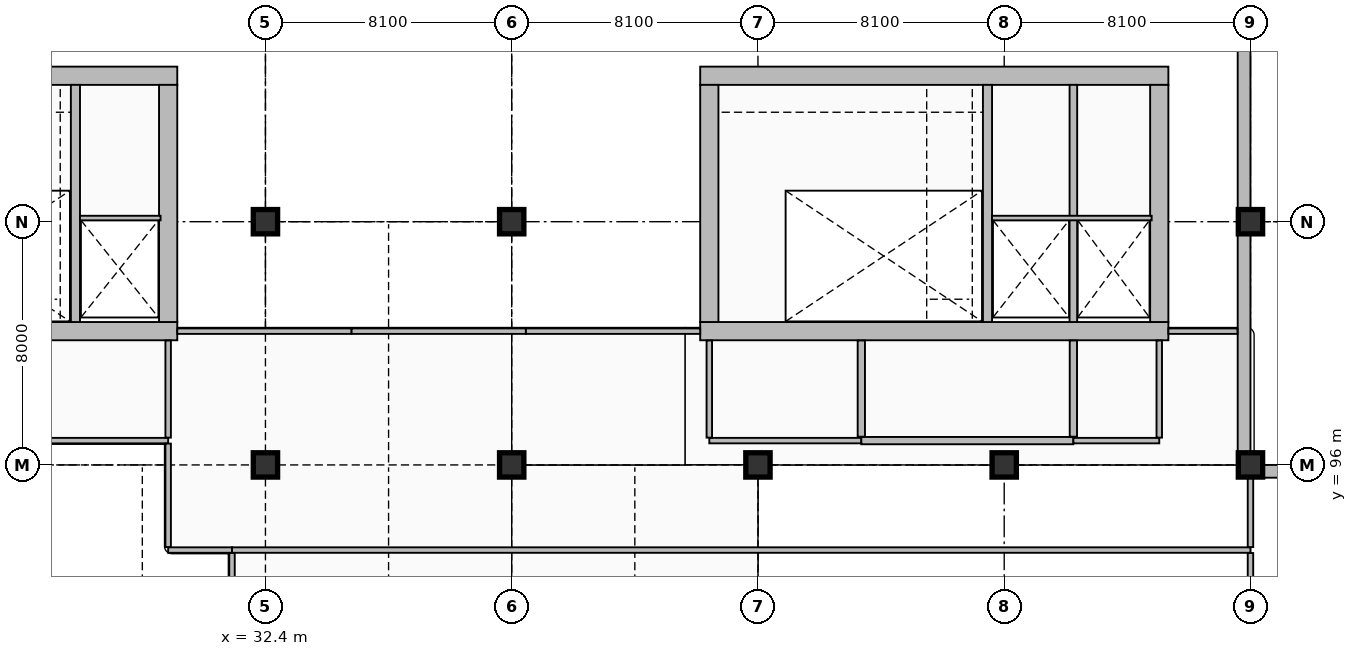
"""IFC4 building model, lengths in metres.
Left out: names, types, materials, properties, quantities, classifications, styles, units other than length and angle.
Written with IfcOpenShell. Run it as: python <this file> out.ifc"""

import sys

from ifc_helpers import new_model, si_unit, direction, frame, frame_2d, origin, origin_2d, place, context, subcontext, project, spatial, rectangle, extrude, element, fill, save


model = new_model("IFC4")
c1 = context("Model", 3, precision=1e-05, world=origin(), true_north=direction((0.0, 1.0)))
c2 = subcontext(c1, "Body", "Model", "MODEL_VIEW")
j1 = project(units=[si_unit("LENGTHUNIT", "METRE"), si_unit("PLANEANGLEUNIT", "RADIAN")], contexts=[c1])
p1 = place(None, origin())
s1 = spatial("IfcSite", under=j1, at=p1, CompositionType="ELEMENT")
p2 = place(p1, origin())
s2 = spatial("IfcBuilding", under=s1, at=p2, CompositionType="ELEMENT")
p3 = place(p2, frame((0.0, 0.0, -4.8)))
s3 = spatial("IfcBuildingStorey", under=s2, at=p3, CompositionType="ELEMENT", Elevation=-4.8)
p4 = place(p3, frame((64.59, 111.79, 0.0), z_axis=(0.0, 0.0, 1.0), x_axis=(0.0, -1.0, 0.0)))
e1 = element("IfcWall", 1, at=p4, inside=s3, PredefinedType="USERDEFINED", context=c2, shape_type="SweptSolid", body=[
    extrude(rectangle(XDim=15.79, YDim=0.42, at=frame_2d((7.895, 0.0))), origin(), (0.0, 0.0, 1.0), 4.45),
])
p5 = place(p3, frame((64.8, 95.79, 0.0), z_axis=(0.0, 0.0, 1.0), x_axis=(1.0, 0.0, 0.0)))
e2 = element("IfcWall", 2, at=p5, inside=s3, PredefinedType="USERDEFINED", context=c2, shape_type="SweptSolid", body=[
    extrude(rectangle(XDim=61.99, YDim=0.42, at=frame_2d((30.995, 0.0))), origin(), (0.0, 0.0, 1.0), 4.45),
])
p6 = place(p3, frame((16.42, 100.4, 0.0), z_axis=(0.0, 0.0, 1.0), x_axis=(1.0, 0.0, 0.0)))
e3 = element("IfcWall", 3, at=p6, inside=s3, PredefinedType="SHEAR", context=c2, shape_type="SweptSolid", body=[
    extrude(rectangle(XDim=13.08, YDim=0.6, at=frame_2d((6.54, 0.0))), origin(), (0.0, 0.0, 1.0), 4.8),
])
p7 = place(p6, frame((1.33, 0.0, 0.0)))
e4 = element("IfcOpeningElement", 4, at=p7, cuts=e3, PredefinedType="OPENING", context=c2, shape_type="SweptSolid", body=[
    extrude(rectangle(XDim=1.15, YDim=2.25, at=frame_2d((0.575, 1.125))), frame((0.0, 0.31, 0.0), z_axis=(0.0, -1.0, 0.0), x_axis=(1.0, 0.0, 0.0)), (0.0, 0.0, 1.0), 0.62),
])
p8 = place(p6, frame((10.635, 0.0, 0.0)))
e5 = element("IfcOpeningElement", 5, at=p8, cuts=e3, PredefinedType="OPENING", context=c2, shape_type="SweptSolid", body=[
    extrude(rectangle(XDim=1.1, YDim=2.2, at=frame_2d((0.55, 1.1))), frame((0.0, 0.31, 0.0), z_axis=(0.0, -1.0, 0.0), x_axis=(1.0, 0.0, 0.0)), (0.0, 0.0, 1.0), 0.62),
])
p9 = place(p3, frame((16.42, 108.8, 0.0), z_axis=(0.0, 0.0, 1.0), x_axis=(1.0, 0.0, 0.0)))
e6 = element("IfcWall", 6, at=p9, inside=s3, PredefinedType="SHEAR", context=c2, shape_type="SweptSolid", body=[
    extrude(rectangle(XDim=13.08, YDim=0.6, at=frame_2d((6.54, 0.0))), origin(), (0.0, 0.0, 1.0), 4.8),
])
p10 = place(p3, frame((29.2, 100.7, 0.0), z_axis=(0.0, 0.0, 1.0), x_axis=(0.0, 1.0, 0.0)))
e7 = element("IfcWall", 7, at=p10, inside=s3, PredefinedType="SHEAR", context=c2, shape_type="SweptSolid", body=[
    extrude(rectangle(XDim=7.8, YDim=0.6, at=frame_2d((3.9, 0.0))), origin(), (0.0, 0.0, 1.0), 4.8),
])
p11 = place(p3, frame((26.15, 100.7, 0.0), z_axis=(0.0, 0.0, 1.0), x_axis=(0.0, 1.0, 0.0)))
e8 = element("IfcWall", 8, at=p11, inside=s3, PredefinedType="SHEAR", context=c2, shape_type="SweptSolid", body=[
    extrude(rectangle(XDim=7.8, YDim=0.3, at=frame_2d((3.9, 0.0))), origin(), (0.0, 0.0, 1.0), 4.8),
])
p12 = place(p3, frame((46.7, 100.4, 0.0), z_axis=(0.0, 0.0, 1.0), x_axis=(1.0, 0.0, 0.0)))
e9 = element("IfcWall", 9, at=p12, inside=s3, PredefinedType="SHEAR", context=c2, shape_type="SweptSolid", body=[
    extrude(rectangle(XDim=15.4, YDim=0.6, at=frame_2d((7.7, 0.0))), origin(), (0.0, 0.0, 1.0), 4.8),
])
p13 = place(p12, frame((1.05, 0.0, 0.0)))
e10 = element("IfcOpeningElement", 10, at=p13, cuts=e9, PredefinedType="OPENING", context=c2, shape_type="SweptSolid", body=[
    extrude(rectangle(XDim=1.15, YDim=2.25, at=frame_2d((0.575, 1.125))), frame((0.0, 0.31, 0.0), z_axis=(0.0, -1.0, 0.0), x_axis=(1.0, 0.0, 0.0)), (0.0, 0.0, 1.0), 0.62),
])
p14 = place(p12, frame((10.333, 0.0, 0.0)))
e11 = element("IfcOpeningElement", 11, at=p14, cuts=e9, PredefinedType="OPENING", context=c2, shape_type="SweptSolid", body=[
    extrude(rectangle(XDim=1.1, YDim=2.2, at=frame_2d((0.55, 1.1))), frame((0.0, 0.31, 0.0), z_axis=(0.0, -1.0, 0.0), x_axis=(1.0, 0.0, 0.0)), (0.0, 0.0, 1.0), 0.62),
])
p15 = place(p12, frame((13.048, 0.0, 0.0)))
e12 = element("IfcOpeningElement", 12, at=p15, cuts=e9, PredefinedType="OPENING", context=c2, shape_type="SweptSolid", body=[
    extrude(rectangle(XDim=1.1, YDim=2.2, at=frame_2d((0.55, 1.1))), frame((0.0, 0.31, 0.0), z_axis=(0.0, -1.0, 0.0), x_axis=(1.0, 0.0, 0.0)), (0.0, 0.0, 1.0), 0.62),
])
p16 = place(p3, frame((46.7, 108.8, 0.0), z_axis=(0.0, 0.0, 1.0), x_axis=(1.0, 0.0, 0.0)))
e13 = element("IfcWall", 13, at=p16, inside=s3, PredefinedType="SHEAR", context=c2, shape_type="SweptSolid", body=[
    extrude(rectangle(XDim=15.4, YDim=0.6, at=frame_2d((7.7, 0.0))), origin(), (0.0, 0.0, 1.0), 4.8),
])
for number, where, z_axis, x_axis in (
    (14, (47.0, 100.7, 0.0), (0.0, 0.0, 1.0), (0.0, 1.0, 0.0)),
    (15, (61.8, 100.7, 0.0), (0.0, 0.0, 1.0), (0.0, 1.0, 0.0)),
):
    element("IfcWall", number, at=place(p3, frame(where, z_axis=z_axis, x_axis=x_axis)), inside=s3, PredefinedType="SHEAR", context=c2, shape_type="SweptSolid", body=[
        extrude(rectangle(XDim=7.8, YDim=0.6, at=frame_2d((3.9, 0.0))), origin(), (0.0, 0.0, 1.0), 4.8),
    ])
p17 = place(p3, frame((56.15, 100.7, 0.0), z_axis=(0.0, 0.0, 1.0), x_axis=(0.0, 1.0, 0.0)))
e16 = element("IfcWall", 16, at=p17, inside=s3, PredefinedType="SHEAR", context=c2, shape_type="SweptSolid", body=[
    extrude(rectangle(XDim=7.8, YDim=0.3, at=frame_2d((3.9, 0.0))), origin(), (0.0, 0.0, 1.0), 4.8),
])
p18 = place(p3, frame((58.975, 100.7, 0.0), z_axis=(0.0, 0.0, 1.0), x_axis=(0.0, 1.0, 0.0)))
e17 = element("IfcWall", 17, at=p18, inside=s3, PredefinedType="SHEAR", context=c2, shape_type="SweptSolid", body=[
    extrude(rectangle(XDim=7.8, YDim=0.25, at=frame_2d((3.9, 0.0))), origin(), (0.0, 0.0, 1.0), 4.8),
])
for number, where, z_axis, x_axis in (
    (18, (32.4, 96.0, 0.0), (0.0, 0.0, 1.0), (1.0, 0.0, 0.0)),
    (19, (32.4, 104.0, 0.0), (0.0, 0.0, 1.0), (1.0, 0.0, 0.0)),
    (20, (40.5, 96.0, 0.0), (0.0, 0.0, 1.0), (1.0, 0.0, 0.0)),
    (21, (40.5, 104.0, 0.0), (0.0, 0.0, 1.0), (1.0, 0.0, 0.0)),
    (22, (48.6, 96.0, 0.0), (0.0, 0.0, 1.0), (1.0, 0.0, 0.0)),
    (23, (56.7, 96.0, 0.0), (0.0, 0.0, 1.0), (1.0, 0.0, 0.0)),
    (24, (64.8, 96.0, 0.0), (0.0, 0.0, 1.0), (1.0, 0.0, 0.0)),
    (25, (64.8, 104.0, 0.0), (0.0, 0.0, 1.0), (1.0, 0.0, 0.0)),
):
    element("IfcColumn", number, at=place(p3, frame(where, z_axis=z_axis, x_axis=x_axis)), inside=s3, PredefinedType="COLUMN", context=c2, shape_type="SweptSolid", body=[
        extrude(rectangle(XDim=0.8, YDim=0.8, at=origin_2d()), origin(), (0.0, 0.0, 1.0), 4.8),
    ])
p19 = place(p3, frame((26.3, 104.12, 0.0), z_axis=(0.0, 0.0, 1.0), x_axis=(1.0, 0.0, 0.0)))
e26 = element("IfcWall", 26, at=p19, inside=s3, PredefinedType="PARTITIONING", context=c2, shape_type="SweptSolid", body=[
    extrude(rectangle(XDim=2.65, YDim=0.15, at=frame_2d((1.325, 0.0))), origin(), (0.0, 0.0, 1.0), 4.45),
])
p20 = place(p3, frame((56.3, 104.12, 0.0), z_axis=(0.0, 0.0, 1.0), x_axis=(1.0, 0.0, 0.0)))
e27 = element("IfcWall", 27, at=p20, inside=s3, PredefinedType="PARTITIONING", context=c2, shape_type="SweptSolid", body=[
    extrude(rectangle(XDim=5.25, YDim=0.15, at=frame_2d((2.625, 0.0))), origin(), (0.0, 0.0, 1.0), 4.45),
])
p21 = place(p3, frame((16.628, 96.8, 0.0), z_axis=(0.0, 0.0, 1.0), x_axis=(1.0, 0.0, 0.0)))
e28 = element("IfcWall", 28, at=p21, inside=s3, PredefinedType="PARTITIONING", context=c2, shape_type="SweptSolid", body=[
    extrude(rectangle(XDim=12.572, YDim=0.18, at=frame_2d((6.286, 0.0))), origin(), (0.0, 0.0, 1.0), 4.45),
])
p22 = place(p21, frame((4.73, 0.0, 0.0)))
e29 = element("IfcOpeningElement", 29, at=p22, cuts=e28, PredefinedType="OPENING", context=c2, shape_type="SweptSolid", body=[
    extrude(rectangle(XDim=1.1, YDim=2.2, at=frame_2d((0.55, 1.1))), frame((0.0, 0.1, 0.0), z_axis=(0.0, -1.0, 0.0), x_axis=(1.0, 0.0, 0.0)), (0.0, 0.0, 1.0), 0.2),
])
p23 = place(p3, frame((29.2, 93.2, 0.0), z_axis=(0.0, 0.0, 1.0), x_axis=(1.0, 0.0, 0.0)))
e30 = element("IfcWall", 30, at=p23, inside=s3, PredefinedType="PARTITIONING", context=c2, shape_type="SweptSolid", body=[
    extrude(rectangle(XDim=2.1, YDim=0.18, at=frame_2d((1.05, 0.0))), origin(), (0.0, 0.0, 1.0), 4.45),
])
p24 = place(p3, frame((29.5, 100.4, 0.0), z_axis=(0.0, 0.0, 1.0), x_axis=(1.0, 0.0, 0.0)))
e31 = element("IfcWall", 31, at=p24, inside=s3, PredefinedType="PARTITIONING", context=c2, shape_type="SweptSolid", body=[
    extrude(rectangle(XDim=5.733, YDim=0.18, at=frame_2d((2.867, 0.0))), origin(), (0.0, 0.0, 1.0), 4.45),
])
p25 = place(p3, frame((35.233, 100.4, 0.0), z_axis=(0.0, 0.0, 1.0), x_axis=(1.0, 0.0, 0.0)))
e32 = element("IfcWall", 32, at=p25, inside=s3, PredefinedType="PARTITIONING", context=c2, shape_type="SweptSolid", body=[
    extrude(rectangle(XDim=5.733, YDim=0.18, at=frame_2d((2.867, 0.0))), origin(), (0.0, 0.0, 1.0), 4.45),
])
p26 = place(p3, frame((40.967, 100.4, 0.0), z_axis=(0.0, 0.0, 1.0), x_axis=(1.0, 0.0, 0.0)))
e33 = element("IfcWall", 33, at=p26, inside=s3, PredefinedType="PARTITIONING", context=c2, shape_type="SweptSolid", body=[
    extrude(rectangle(XDim=5.733, YDim=0.18, at=frame_2d((2.867, 0.0))), origin(), (0.0, 0.0, 1.0), 4.45),
])
p27 = place(p3, frame((31.3, 93.2, 0.0), z_axis=(0.0, 0.0, 1.0), x_axis=(1.0, 0.0, 0.0)))
e34 = element("IfcWall", 34, at=p27, inside=s3, PredefinedType="PARTITIONING", context=c2, shape_type="SweptSolid", body=[
    extrude(rectangle(XDim=33.5, YDim=0.18, at=frame_2d((16.75, 0.0))), origin(), (0.0, 0.0, 1.0), 4.45),
])
p28 = place(p27, frame((16.15, 0.0, 0.0)))
e35 = element("IfcOpeningElement", 35, at=p28, cuts=e34, PredefinedType="OPENING", context=c2, shape_type="SweptSolid", body=[
    extrude(rectangle(XDim=1.2, YDim=2.2, at=frame_2d((0.6, 1.1))), frame((0.0, 0.1, 0.0), z_axis=(0.0, -1.0, 0.0), x_axis=(1.0, 0.0, 0.0)), (0.0, 0.0, 1.0), 0.2),
])
p29 = place(p3, frame((47.0, 96.8, 0.0), z_axis=(0.0, 0.0, 1.0), x_axis=(1.0, 0.0, 0.0)))
e36 = element("IfcWall", 36, at=p29, inside=s3, PredefinedType="PARTITIONING", context=c2, shape_type="SweptSolid", body=[
    extrude(rectangle(XDim=5.0, YDim=0.18, at=frame_2d((2.5, 0.0))), origin(), (0.0, 0.0, 1.0), 4.45),
])
p30 = place(p29, frame((3.55, 0.0, 0.0)))
e37 = element("IfcOpeningElement", 37, at=p30, cuts=e36, PredefinedType="OPENING", context=c2, shape_type="SweptSolid", body=[
    extrude(rectangle(XDim=1.1, YDim=2.2, at=frame_2d((0.55, 1.1))), frame((0.0, 0.1, 0.0), z_axis=(0.0, -1.0, 0.0), x_axis=(1.0, 0.0, 0.0)), (0.0, 0.0, 1.0), 0.2),
])
p31 = place(p3, frame((52.0, 96.8, 0.0), z_axis=(0.0, 0.0, 1.0), x_axis=(1.0, 0.0, 0.0)))
e38 = element("IfcWall", 38, at=p31, inside=s3, PredefinedType="PARTITIONING", context=c2, shape_type="SweptSolid", body=[
    extrude(rectangle(XDim=6.975, YDim=0.24, at=frame_2d((3.488, 0.0))), origin(), (0.0, 0.0, 1.0), 4.45),
])
p32 = place(p31, frame((1.771, 0.0, 0.0)))
e39 = element("IfcOpeningElement", 39, at=p32, cuts=e38, PredefinedType="OPENING", context=c2, shape_type="SweptSolid", body=[
    extrude(rectangle(XDim=1.2, YDim=2.3, at=frame_2d((0.6, 1.15))), frame((0.0, 0.13, 0.0), z_axis=(0.0, -1.0, 0.0), x_axis=(1.0, 0.0, 0.0)), (0.0, 0.0, 1.0), 0.26),
])
p33 = place(p3, frame((58.975, 96.8, 0.0), z_axis=(0.0, 0.0, 1.0), x_axis=(1.0, 0.0, 0.0)))
e40 = element("IfcWall", 40, at=p33, inside=s3, PredefinedType="PARTITIONING", context=c2, shape_type="SweptSolid", body=[
    extrude(rectangle(XDim=2.825, YDim=0.18, at=frame_2d((1.413, 0.0))), origin(), (0.0, 0.0, 1.0), 4.45),
])
p34 = place(p33, frame((0.863, 0.0, 0.0)))
e41 = element("IfcOpeningElement", 41, at=p34, cuts=e40, PredefinedType="OPENING", context=c2, shape_type="SweptSolid", body=[
    extrude(rectangle(XDim=1.1, YDim=2.2, at=frame_2d((0.55, 1.1))), frame((0.0, 0.1, 0.0), z_axis=(0.0, -1.0, 0.0), x_axis=(1.0, 0.0, 0.0)), (0.0, 0.0, 1.0), 0.2),
])
p35 = place(p3, frame((62.1, 100.4, 0.0), z_axis=(0.0, 0.0, 1.0), x_axis=(1.0, 0.0, 0.0)))
e42 = element("IfcWall", 42, at=p35, inside=s3, PredefinedType="PARTITIONING", context=c2, shape_type="SweptSolid", body=[
    extrude(rectangle(XDim=2.272, YDim=0.18, at=frame_2d((1.136, 0.0))), origin(), (0.0, 0.0, 1.0), 4.45),
])
p36 = place(p3, frame((29.2, 93.298, 0.0), z_axis=(0.0, 0.0, 1.0), x_axis=(0.0, 1.0, 0.0)))
e43 = element("IfcWall", 43, at=p36, inside=s3, PredefinedType="PARTITIONING", context=c2, shape_type="SweptSolid", body=[
    extrude(rectangle(XDim=3.404, YDim=0.18, at=frame_2d((1.702, 0.0))), origin(), (0.0, 0.0, 1.0), 4.45),
])
p37 = place(p3, frame((29.2, 96.898, 0.0), z_axis=(0.0, 0.0, 1.0), x_axis=(0.0, 1.0, 0.0)))
e44 = element("IfcWall", 44, at=p37, inside=s3, PredefinedType="PARTITIONING", context=c2, shape_type="SweptSolid", body=[
    extrude(rectangle(XDim=3.194, YDim=0.18, at=frame_2d((1.597, 0.0))), origin(), (0.0, 0.0, 1.0), 4.45),
])
p38 = place(p37, frame((0.997, 0.0, 0.0)))
e45 = element("IfcOpeningElement", 45, at=p38, cuts=e44, PredefinedType="OPENING", context=c2, shape_type="SweptSolid", body=[
    extrude(rectangle(XDim=1.2, YDim=2.2, at=frame_2d((0.6, 1.1))), frame((0.0, 0.1, 0.0), z_axis=(0.0, -1.0, 0.0), x_axis=(1.0, 0.0, 0.0)), (0.0, 0.0, 1.0), 0.2),
])
p39 = place(p3, frame((31.3, 87.898, 0.0), z_axis=(0.0, 0.0, 1.0), x_axis=(0.0, 1.0, 0.0)))
e46 = element("IfcWall", 46, at=p39, inside=s3, PredefinedType="PARTITIONING", context=c2, shape_type="SweptSolid", body=[
    extrude(rectangle(XDim=5.204, YDim=0.18, at=frame_2d((2.602, 0.0))), origin(), (0.0, 0.0, 1.0), 4.45),
])
p40 = place(p3, frame((47.0, 96.898, 0.0), z_axis=(0.0, 0.0, 1.0), x_axis=(0.0, 1.0, 0.0)))
e47 = element("IfcWall", 47, at=p40, inside=s3, PredefinedType="PARTITIONING", context=c2, shape_type="SweptSolid", body=[
    extrude(rectangle(XDim=3.194, YDim=0.18, at=frame_2d((1.597, 0.0))), origin(), (0.0, 0.0, 1.0), 4.45),
])
p41 = place(p3, frame((52.0, 96.928, 0.0), z_axis=(0.0, 0.0, 1.0), x_axis=(0.0, 1.0, 0.0)))
e48 = element("IfcWall", 48, at=p41, inside=s3, PredefinedType="PARTITIONING", context=c2, shape_type="SweptSolid", body=[
    extrude(rectangle(XDim=3.164, YDim=0.24, at=frame_2d((1.582, 0.0))), origin(), (0.0, 0.0, 1.0), 4.45),
])
p42 = place(p41, frame((1.082, 0.0, 0.0)))
e49 = element("IfcOpeningElement", 49, at=p42, cuts=e48, PredefinedType="OPENING", context=c2, shape_type="SweptSolid", body=[
    extrude(rectangle(XDim=1.0, YDim=2.2, at=frame_2d((0.5, 1.1))), frame((0.0, 0.13, 0.0), z_axis=(0.0, -1.0, 0.0), x_axis=(1.0, 0.0, 0.0)), (0.0, 0.0, 1.0), 0.26),
])
p43 = place(p3, frame((58.975, 96.928, 0.0), z_axis=(0.0, 0.0, 1.0), x_axis=(0.0, 1.0, 0.0)))
e50 = element("IfcWall", 50, at=p43, inside=s3, PredefinedType="PARTITIONING", context=c2, shape_type="SweptSolid", body=[
    extrude(rectangle(XDim=3.164, YDim=0.24, at=frame_2d((1.582, 0.0))), origin(), (0.0, 0.0, 1.0), 4.45),
])
p44 = place(p3, frame((61.8, 96.898, 0.0), z_axis=(0.0, 0.0, 1.0), x_axis=(0.0, 1.0, 0.0)))
e51 = element("IfcWall", 51, at=p44, inside=s3, PredefinedType="PARTITIONING", context=c2, shape_type="SweptSolid", body=[
    extrude(rectangle(XDim=3.194, YDim=0.18, at=frame_2d((1.597, 0.0))), origin(), (0.0, 0.0, 1.0), 4.45),
])
p45 = place(p3, frame((64.8, 88.308, 0.0), z_axis=(0.0, 0.0, 1.0), x_axis=(0.0, 1.0, 0.0)))
e52 = element("IfcWall", 52, at=p45, inside=s3, PredefinedType="PARTITIONING", context=c2, shape_type="SweptSolid", body=[
    extrude(rectangle(XDim=4.794, YDim=0.18, at=frame_2d((2.397, 0.0))), origin(), (0.0, 0.0, 1.0), 4.45),
])
p46 = place(p3, frame((64.8, 93.298, 0.0), z_axis=(0.0, 0.0, 1.0), x_axis=(0.0, 1.0, 0.0)))
e53 = element("IfcWall", 53, at=p46, inside=s3, PredefinedType="PARTITIONING", context=c2, shape_type="SweptSolid", body=[
    extrude(rectangle(XDim=2.274, YDim=0.18, at=frame_2d((1.137, 0.0))), origin(), (0.0, 0.0, 1.0), 4.45),
])
p47 = place(p8, frame((1.1, 0.0, 0.0), z_axis=(0.0, 0.0, 1.0), x_axis=(-1.0, 0.0, 0.0)))
e54 = element("IfcDoor", 54, at=p47, inside=s3, OperationType="DOUBLE_DOOR_SLIDING", PredefinedType="DOOR", context=c2, shape_type="SweptSolid", body=[
    extrude(rectangle(XDim=1.1, YDim=2.2, at=frame_2d((0.55, 1.1))), frame((0.0, 0.025, 0.0), z_axis=(0.0, -1.0, 0.0), x_axis=(1.0, 0.0, 0.0)), (0.0, 0.0, 1.0), 0.05),
])
fill(e5, e54)
p48 = place(p13, frame((1.15, 0.0, 0.0), z_axis=(0.0, 0.0, 1.0), x_axis=(-1.0, 0.0, 0.0)))
e55 = element("IfcDoor", 55, at=p48, inside=s3, OperationType="SINGLE_SWING_LEFT", PredefinedType="DOOR", context=c2, shape_type="SweptSolid", body=[
    extrude(rectangle(XDim=1.15, YDim=2.25, at=frame_2d((0.575, 1.125))), frame((0.0, 0.025, 0.0), z_axis=(0.0, -1.0, 0.0), x_axis=(1.0, 0.0, 0.0)), (0.0, 0.0, 1.0), 0.05),
])
fill(e10, e55)
p49 = place(p14, frame((1.1, 0.0, 0.0), z_axis=(0.0, 0.0, 1.0), x_axis=(-1.0, 0.0, 0.0)))
e56 = element("IfcDoor", 56, at=p49, inside=s3, OperationType="DOUBLE_DOOR_SLIDING", PredefinedType="DOOR", context=c2, shape_type="SweptSolid", body=[
    extrude(rectangle(XDim=1.1, YDim=2.2, at=frame_2d((0.55, 1.1))), frame((0.0, 0.025, 0.0), z_axis=(0.0, -1.0, 0.0), x_axis=(1.0, 0.0, 0.0)), (0.0, 0.0, 1.0), 0.05),
])
fill(e11, e56)
p50 = place(p15, frame((1.1, 0.0, 0.0), z_axis=(0.0, 0.0, 1.0), x_axis=(-1.0, 0.0, 0.0)))
e57 = element("IfcDoor", 57, at=p50, inside=s3, OperationType="DOUBLE_DOOR_SLIDING", PredefinedType="DOOR", context=c2, shape_type="SweptSolid", body=[
    extrude(rectangle(XDim=1.1, YDim=2.2, at=frame_2d((0.55, 1.1))), frame((0.0, 0.025, 0.0), z_axis=(0.0, -1.0, 0.0), x_axis=(1.0, 0.0, 0.0)), (0.0, 0.0, 1.0), 0.05),
])
fill(e12, e57)
p51 = place(p28, origin())
e58 = element("IfcDoor", 58, at=p51, inside=s3, OperationType="SINGLE_SWING_RIGHT", PredefinedType="DOOR", context=c2, shape_type="SweptSolid", body=[
    extrude(rectangle(XDim=1.2, YDim=2.2, at=frame_2d((0.6, 1.1))), frame((0.0, 0.025, 0.0), z_axis=(0.0, -1.0, 0.0), x_axis=(1.0, 0.0, 0.0)), (0.0, 0.0, 1.0), 0.05),
])
fill(e35, e58)
p52 = place(p30, frame((1.1, 0.0, 0.0), z_axis=(0.0, 0.0, 1.0), x_axis=(-1.0, 0.0, 0.0)))
e59 = element("IfcDoor", 59, at=p52, inside=s3, OperationType="SINGLE_SWING_RIGHT", PredefinedType="DOOR", context=c2, shape_type="SweptSolid", body=[
    extrude(rectangle(XDim=1.1, YDim=2.2, at=frame_2d((0.55, 1.1))), frame((0.0, 0.025, 0.0), z_axis=(0.0, -1.0, 0.0), x_axis=(1.0, 0.0, 0.0)), (0.0, 0.0, 1.0), 0.05),
])
fill(e37, e59)
p53 = place(p32, frame((1.2, 0.0, 0.0), z_axis=(0.0, 0.0, 1.0), x_axis=(-1.0, 0.0, 0.0)))
e60 = element("IfcDoor", 60, at=p53, inside=s3, OperationType="SINGLE_SWING_LEFT", PredefinedType="DOOR", context=c2, shape_type="SweptSolid", body=[
    extrude(rectangle(XDim=1.2, YDim=2.3, at=frame_2d((0.6, 1.15))), frame((0.0, 0.025, 0.0), z_axis=(0.0, -1.0, 0.0), x_axis=(1.0, 0.0, 0.0)), (0.0, 0.0, 1.0), 0.05),
])
fill(e39, e60)
p54 = place(p34, frame((1.1, 0.0, 0.0), z_axis=(0.0, 0.0, 1.0), x_axis=(-1.0, 0.0, 0.0)))
e61 = element("IfcDoor", 61, at=p54, inside=s3, OperationType="SINGLE_SWING_RIGHT", PredefinedType="DOOR", context=c2, shape_type="SweptSolid", body=[
    extrude(rectangle(XDim=1.1, YDim=2.2, at=frame_2d((0.55, 1.1))), frame((0.0, 0.025, 0.0), z_axis=(0.0, -1.0, 0.0), x_axis=(1.0, 0.0, 0.0)), (0.0, 0.0, 1.0), 0.05),
])
fill(e41, e61)
p55 = place(p38, frame((1.2, 0.0, 0.0), z_axis=(0.0, 0.0, 1.0), x_axis=(-1.0, 0.0, 0.0)))
e62 = element("IfcDoor", 62, at=p55, inside=s3, OperationType="SINGLE_SWING_LEFT", PredefinedType="DOOR", context=c2, shape_type="SweptSolid", body=[
    extrude(rectangle(XDim=1.2, YDim=2.2, at=frame_2d((0.6, 1.1))), frame((0.0, 0.025, 0.0), z_axis=(0.0, -1.0, 0.0), x_axis=(1.0, 0.0, 0.0)), (0.0, 0.0, 1.0), 0.05),
])
fill(e45, e62)
p56 = place(p42, origin())
e63 = element("IfcDoor", 63, at=p56, inside=s3, OperationType="SINGLE_SWING_RIGHT", PredefinedType="DOOR", context=c2, shape_type="SweptSolid", body=[
    extrude(rectangle(XDim=1.0, YDim=2.2, at=frame_2d((0.5, 1.1))), frame((0.0, 0.025, 0.0), z_axis=(0.0, -1.0, 0.0), x_axis=(1.0, 0.0, 0.0)), (0.0, 0.0, 1.0), 0.05),
])
fill(e49, e63)
save(model, sys.argv[1])
